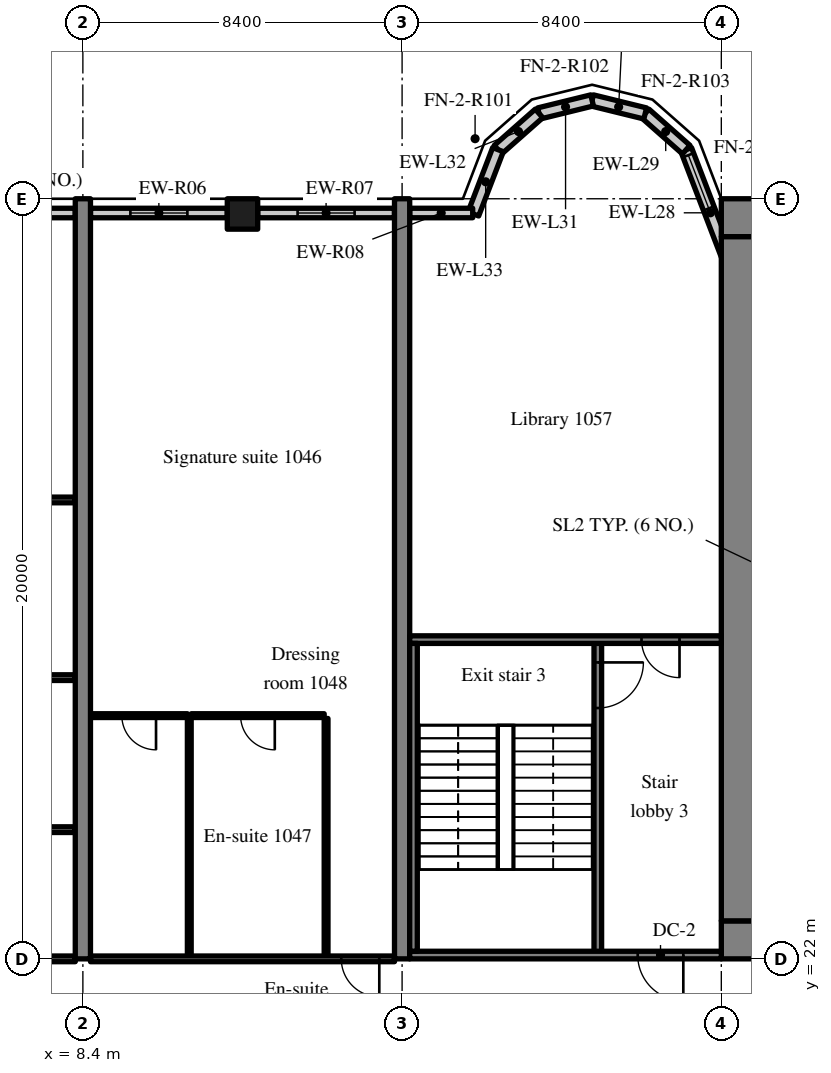
"""IFC4 building model, lengths in metres.
Left out: names, types, materials, properties, quantities, classifications, styles, units other than length and angle.
Written with IfcOpenShell. Run it as: python <this file> out.ifc"""

import sys

from ifc_helpers import new_model, si_unit, direction, frame, frame_2d, origin, origin_2d, place, context, subcontext, project, spatial, rectangle, extrude, source, transform, mapped, element, fill, save


model = new_model("IFC4")
c1 = context("Model", 3, precision=1e-05, world=origin(), true_north=direction((0.0, 1.0)))
c2 = subcontext(c1, "Body", "Model", "MODEL_VIEW")
j1 = project(units=[si_unit("LENGTHUNIT", "METRE"), si_unit("PLANEANGLEUNIT", "RADIAN")], contexts=[c1])
p1 = place(None, origin())
s1 = spatial("IfcSite", under=j1, at=p1, CompositionType="ELEMENT")
p2 = place(p1, origin())
s2 = spatial("IfcBuilding", under=s1, at=p2, CompositionType="ELEMENT")
p3 = place(p2, frame((0.0, 0.0, 46.8)))
s3 = spatial("IfcBuildingStorey", under=s2, at=p3, CompositionType="ELEMENT", Elevation=46.8)
m1 = source(origin(), c2, "Body", "SweptSolid", [
    extrude(rectangle(XDim=50.4, YDim=1.0, at=frame_2d((25.2, 0.0))), origin(), (0.0, 0.0, 1.0), 3.52),
])
p4 = place(p3, frame((25.2, 22.5, 0.0), z_axis=(0.0, 0.0, 1.0), x_axis=(1.0, 0.0, 0.0)))
e1 = element("IfcWall", 1, at=p4, inside=s3, PredefinedType="SHEAR", context=c2, shape_type="MappedRepresentation", body=[
    mapped(m1, transform((0.0, 0.0, 0.0), scale=1.0)),
])
m2 = source(origin(), c2, "Body", "SweptSolid", [
    extrude(rectangle(XDim=1.8, YDim=2.1, at=frame_2d((0.9, 1.05))), frame((0.0, 0.51, 0.0), z_axis=(0.0, -1.0, 0.0), x_axis=(1.0, 0.0, 0.0)), (0.0, 0.0, 1.0), 1.02),
])
p5 = place(p4, frame((15.9, 0.0, 0.0)))
e2 = element("IfcOpeningElement", 2, at=p5, cuts=e1, PredefinedType="OPENING", context=c2, shape_type="MappedRepresentation", body=[
    mapped(m2, transform((0.0, 0.0, 0.0), scale=1.0)),
])
m3 = source(origin(), c2, "Body", "SweptSolid", [
    extrude(rectangle(XDim=1.2, YDim=2.1, at=frame_2d((0.6, 1.05))), frame((0.0, 0.51, 0.0), z_axis=(0.0, -1.0, 0.0), x_axis=(1.0, 0.0, 0.0)), (0.0, 0.0, 1.0), 1.02),
])
p6 = place(p4, frame((26.987, 0.0, 0.0)))
e3 = element("IfcOpeningElement", 3, at=p6, cuts=e1, PredefinedType="OPENING", context=c2, shape_type="MappedRepresentation", body=[
    mapped(m3, transform((0.0, 0.0, 0.0), scale=1.0)),
])
m4 = source(origin(), c2, "Body", "SweptSolid", [
    extrude(rectangle(XDim=0.9, YDim=2.1, at=frame_2d((0.45, 1.05))), frame((0.0, 0.51, 0.0), z_axis=(0.0, -1.0, 0.0), x_axis=(1.0, 0.0, 0.0)), (0.0, 0.0, 1.0), 1.02),
])
p7 = place(p4, frame((33.75, 0.0, 0.0)))
e4 = element("IfcOpeningElement", 4, at=p7, cuts=e1, PredefinedType="OPENING", context=c2, shape_type="MappedRepresentation", body=[
    mapped(m4, transform((0.0, 0.0, 0.0), scale=1.0)),
])
p8 = place(p4, frame((30.75, 0.0, 0.0)))
e5 = element("IfcOpeningElement", 5, at=p8, cuts=e1, PredefinedType="OPENING", context=c2, shape_type="MappedRepresentation", body=[
    mapped(m4, transform((0.0, 0.0, 0.0), scale=1.0)),
])
p9 = place(p4, frame((38.262, 0.0, 0.0)))
e6 = element("IfcOpeningElement", 6, at=p9, cuts=e1, PredefinedType="OPENING", context=c2, shape_type="MappedRepresentation", body=[
    mapped(m4, transform((0.0, 0.0, 0.0), scale=1.0)),
])
p10 = place(p4, frame((6.438, 0.0, 0.0)))
e7 = element("IfcOpeningElement", 7, at=p10, cuts=e1, PredefinedType="OPENING", context=c2, shape_type="MappedRepresentation", body=[
    mapped(m3, transform((0.0, 0.0, 0.0), scale=1.0)),
])
p11 = place(p4, frame((47.725, 0.0, 0.0)))
e8 = element("IfcOpeningElement", 8, at=p11, cuts=e1, PredefinedType="OPENING", context=c2, shape_type="MappedRepresentation", body=[
    mapped(m3, transform((0.0, 0.0, 0.0), scale=1.0)),
])
p12 = place(p3, frame((25.2, 41.5, 0.0), z_axis=(0.0, 0.0, 1.0), x_axis=(1.0, 0.0, 0.0)))
e9 = element("IfcWall", 9, at=p12, inside=s3, PredefinedType="SHEAR", context=c2, shape_type="MappedRepresentation", body=[
    mapped(m1, transform((0.0, 0.0, 0.0), scale=1.0)),
])
m5 = source(origin(), c2, "Body", "SweptSolid", [
    extrude(rectangle(XDim=18.0, YDim=1.0, at=frame_2d((9.0, 0.0))), origin(), (0.0, 0.0, 1.0), 3.52),
])
p13 = place(p3, frame((25.7, 23.0, 0.0), z_axis=(0.0, 0.0, 1.0), x_axis=(0.0, 1.0, 0.0)))
e10 = element("IfcWall", 10, at=p13, inside=s3, PredefinedType="SHEAR", context=c2, shape_type="MappedRepresentation", body=[
    mapped(m5, transform((0.0, 0.0, 0.0), scale=1.0)),
])
m6 = source(origin(), c2, "Body", "SweptSolid", [
    extrude(rectangle(XDim=20.0, YDim=0.4, at=frame_2d((10.0, 0.0))), origin(), (0.0, 0.0, 1.0), 3.52),
])
for number, where, z_axis, x_axis in (
    (11, (8.4, 22.0, 0.0), (0.0, 0.0, 1.0), (0.0, 1.0, 0.0)),
    (12, (16.8, 22.0, 0.0), (0.0, 0.0, 1.0), (0.0, 1.0, 0.0)),
):
    element("IfcWall", number, at=place(p3, frame(where, z_axis=z_axis, x_axis=x_axis)), inside=s3, PredefinedType="SHEAR", context=c2, shape_type="MappedRepresentation", body=[
        mapped(m6, transform((0.0, 0.0, 0.0), scale=1.0)),
    ])
m7 = source(origin(), c2, "Body", "SweptSolid", [
    extrude(rectangle(XDim=0.8, YDim=0.8, at=origin_2d()), origin(), (0.0, 0.0, 1.0), 3.52),
])
p14 = place(p3, frame((12.6, 41.6, 0.0), z_axis=(0.0, 0.0, 1.0), x_axis=(1.0, 0.0, 0.0)))
e13 = element("IfcColumn", 13, at=p14, inside=s3, PredefinedType="COLUMN", context=c2, shape_type="MappedRepresentation", body=[
    mapped(m7, transform((0.0, 0.0, 0.0), scale=1.0)),
])
m8 = source(origin(), c2, "Body", "SweptSolid", [
    extrude(rectangle(XDim=3.559, YDim=0.3, at=frame_2d((1.78, 0.0))), origin(), (0.0, 0.0, 1.0), 3.52),
])
p15 = place(p3, frame((25.55, 39.969, 0.0), z_axis=(0.0, 0.0, 1.0), x_axis=(-0.35779745313, 0.933799219604, 0.0)))
e14 = element("IfcWall", 14, at=p15, inside=s3, PredefinedType="SOLIDWALL", context=c2, shape_type="MappedRepresentation", body=[
    mapped(m8, transform((0.0, 0.0, 0.0), scale=1.0)),
])
m9 = source(origin(), c2, "Body", "SweptSolid", [
    extrude(rectangle(XDim=1.5, YDim=2.0, at=frame_2d((0.75, 1.0))), frame((0.0, 0.16, 0.0), z_axis=(0.0, -1.0, 0.0), x_axis=(1.0, 0.0, 0.0)), (0.0, 0.0, 1.0), 0.32),
])
p16 = place(p15, frame((1.903, 0.0, 0.9)))
e15 = element("IfcOpeningElement", 15, at=p16, cuts=e14, PredefinedType="OPENING", context=c2, shape_type="MappedRepresentation", body=[
    mapped(m9, transform((0.0, 0.0, 0.0), scale=1.0)),
])
m10 = source(origin(), c2, "Body", "SweptSolid", [
    extrude(rectangle(XDim=1.44, YDim=0.3, at=frame_2d((0.72, 0.0))), origin(), (0.0, 0.0, 1.0), 3.52),
])
p17 = place(p3, frame((24.277, 43.292, 0.0), z_axis=(0.0, 0.0, 1.0), x_axis=(-0.749649827867, 0.661834673902, 0.0)))
e16 = element("IfcWall", 16, at=p17, inside=s3, PredefinedType="SOLIDWALL", context=c2, shape_type="MappedRepresentation", body=[
    mapped(m10, transform((0.0, 0.0, 0.0), scale=1.0)),
])
m11 = source(origin(), c2, "Body", "SweptSolid", [
    extrude(rectangle(XDim=1.438, YDim=0.3, at=frame_2d((0.719, 0.0))), origin(), (0.0, 0.0, 1.0), 3.52),
])
p18 = place(p3, frame((23.197, 44.245, 0.0), z_axis=(0.0, 0.0, 1.0), x_axis=(-0.971152283879, 0.238460146601, 0.0)))
e17 = element("IfcWall", 17, at=p18, inside=s3, PredefinedType="SOLIDWALL", context=c2, shape_type="MappedRepresentation", body=[
    mapped(m11, transform((0.0, 0.0, 0.0), scale=1.0)),
])
m12 = source(origin(), c2, "Body", "SweptSolid", [
    extrude(rectangle(XDim=1.439, YDim=0.3, at=frame_2d((0.719, 0.0))), origin(), (0.0, 0.0, 1.0), 3.52),
])
p19 = place(p3, frame((21.8, 44.588, 0.0), z_axis=(0.0, 0.0, 1.0), x_axis=(-0.971161932466, -0.238420848351, 0.0)))
e18 = element("IfcWall", 18, at=p19, inside=s3, PredefinedType="SOLIDWALL", context=c2, shape_type="MappedRepresentation", body=[
    mapped(m12, transform((0.0, 0.0, 0.0), scale=1.0)),
])
m13 = source(origin(), c2, "Body", "SweptSolid", [
    extrude(rectangle(XDim=1.44, YDim=0.3, at=frame_2d((0.72, 0.0))), origin(), (0.0, 0.0, 1.0), 3.52),
])
p20 = place(p3, frame((20.403, 44.245, 0.0), z_axis=(0.0, 0.0, 1.0), x_axis=(-0.74957555648, -0.661918790432, 0.0)))
e19 = element("IfcWall", 19, at=p20, inside=s3, PredefinedType="SOLIDWALL", context=c2, shape_type="MappedRepresentation", body=[
    mapped(m13, transform((0.0, 0.0, 0.0), scale=1.0)),
])
m14 = source(origin(), c2, "Body", "SweptSolid", [
    extrude(rectangle(XDim=1.812, YDim=0.3, at=frame_2d((0.906, 0.0))), origin(), (0.0, 0.0, 1.0), 3.52),
])
p21 = place(p3, frame((19.323, 43.292, 0.0), z_axis=(0.0, 0.0, 1.0), x_axis=(-0.357877270961, -0.93376863244, 0.0)))
e20 = element("IfcWall", 20, at=p21, inside=s3, PredefinedType="SOLIDWALL", context=c2, shape_type="MappedRepresentation", body=[
    mapped(m14, transform((0.0, 0.0, 0.0), scale=1.0)),
])
m15 = source(origin(), c2, "Body", "SweptSolid", [
    extrude(rectangle(XDim=4.045, YDim=0.25, at=frame_2d((2.022, 0.0))), origin(), (0.0, 0.0, 1.0), 2.82),
])
p22 = place(p3, frame((8.2, 41.625, 0.0), z_axis=(0.0, 0.0, 1.0), x_axis=(-1.0, 0.0, 0.0)))
e21 = element("IfcWall", 21, at=p22, inside=s3, PredefinedType="SOLIDWALL", context=c2, shape_type="MappedRepresentation", body=[
    mapped(m15, transform((0.0, 0.0, 0.0), scale=1.0)),
])
m16 = source(origin(), c2, "Body", "SweptSolid", [
    extrude(rectangle(XDim=1.5, YDim=1.5, at=frame_2d((0.75, 0.75))), frame((0.0, 0.135, 0.0), z_axis=(0.0, -1.0, 0.0), x_axis=(1.0, 0.0, 0.0)), (0.0, 0.0, 1.0), 0.27),
])
p23 = place(p22, frame((1.272, 0.0, 0.9)))
e22 = element("IfcOpeningElement", 22, at=p23, cuts=e21, PredefinedType="OPENING", context=c2, shape_type="MappedRepresentation", body=[
    mapped(m16, transform((0.0, 0.0, 0.0), scale=1.0)),
])
m17 = source(origin(), c2, "Body", "SweptSolid", [
    extrude(rectangle(XDim=3.6, YDim=0.25, at=frame_2d((1.8, 0.0))), origin(), (0.0, 0.0, 1.0), 2.82),
])
p24 = place(p3, frame((12.2, 41.625, 0.0), z_axis=(0.0, 0.0, 1.0), x_axis=(-1.0, 0.0, 0.0)))
e23 = element("IfcWall", 23, at=p24, inside=s3, PredefinedType="SOLIDWALL", context=c2, shape_type="MappedRepresentation", body=[
    mapped(m17, transform((0.0, 0.0, 0.0), scale=1.0)),
])
p25 = place(p24, frame((1.05, 0.0, 0.9)))
e24 = element("IfcOpeningElement", 24, at=p25, cuts=e23, PredefinedType="OPENING", context=c2, shape_type="MappedRepresentation", body=[
    mapped(m16, transform((0.0, 0.0, 0.0), scale=1.0)),
])
m18 = source(origin(), c2, "Body", "SweptSolid", [
    extrude(rectangle(XDim=3.6, YDim=0.25, at=frame_2d((1.8, 0.0))), origin(), (0.0, 0.0, 1.0), 2.82),
])
p26 = place(p3, frame((16.6, 41.625, 0.0), z_axis=(0.0, 0.0, 1.0), x_axis=(-1.0, 0.0, 0.0)))
e25 = element("IfcWall", 25, at=p26, inside=s3, PredefinedType="SOLIDWALL", context=c2, shape_type="MappedRepresentation", body=[
    mapped(m18, transform((0.0, 0.0, 0.0), scale=1.0)),
])
p27 = place(p26, frame((1.05, 0.0, 0.9)))
e26 = element("IfcOpeningElement", 26, at=p27, cuts=e25, PredefinedType="OPENING", context=c2, shape_type="MappedRepresentation", body=[
    mapped(m16, transform((0.0, 0.0, 0.0), scale=1.0)),
])
m19 = source(origin(), c2, "Body", "SweptSolid", [
    extrude(rectangle(XDim=1.658, YDim=0.25, at=frame_2d((0.829, 0.0))), origin(), (0.0, 0.0, 1.0), 2.82),
])
p28 = place(p3, frame((18.658, 41.625, 0.0), z_axis=(0.0, 0.0, 1.0), x_axis=(-1.0, 0.0, 0.0)))
e27 = element("IfcWall", 27, at=p28, inside=s3, PredefinedType="SOLIDWALL", context=c2, shape_type="MappedRepresentation", body=[
    mapped(m19, transform((0.0, 0.0, 0.0), scale=1.0)),
])
m20 = source(origin(), c2, "Body", "SweptSolid", [
    extrude(rectangle(XDim=8.3, YDim=0.2, at=frame_2d((4.15, 0.0))), origin(), (0.0, 0.0, 1.0), 3.52),
])
p29 = place(p3, frame((21.95, 22.1, 0.0), z_axis=(0.0, 0.0, 1.0), x_axis=(0.0, 1.0, 0.0)))
e28 = element("IfcWall", 28, at=p29, inside=s3, PredefinedType="SOLIDWALL", context=c2, shape_type="MappedRepresentation", body=[
    mapped(m20, transform((0.0, 0.0, 0.0), scale=1.0)),
])
m21 = source(origin(), c2, "Body", "SweptSolid", [
    extrude(rectangle(XDim=1.2, YDim=2.1, at=frame_2d((0.6, 1.05))), frame((0.0, 0.11, 0.0), z_axis=(0.0, -1.0, 0.0), x_axis=(1.0, 0.0, 0.0)), (0.0, 0.0, 1.0), 0.22),
])
p30 = place(p29, frame((6.5, 0.0, 0.0)))
e29 = element("IfcOpeningElement", 29, at=p30, cuts=e28, PredefinedType="OPENING", context=c2, shape_type="MappedRepresentation", body=[
    mapped(m21, transform((0.0, 0.0, 0.0), scale=1.0)),
])
m22 = source(origin(), c2, "Body", "SweptSolid", [
    extrude(rectangle(XDim=8.2, YDim=0.2, at=frame_2d((4.1, 0.0))), origin(), (0.0, 0.0, 1.0), 3.52),
])
p31 = place(p3, frame((17.0, 22.1, 0.0), z_axis=(0.0, 0.0, 1.0), x_axis=(1.0, 0.0, 0.0)))
e30 = element("IfcWall", 30, at=p31, inside=s3, PredefinedType="SOLIDWALL", context=c2, shape_type="MappedRepresentation", body=[
    mapped(m22, transform((0.0, 0.0, 0.0), scale=1.0)),
])
p32 = place(p31, frame((6.0, 0.0, 0.0)))
e31 = element("IfcOpeningElement", 31, at=p32, cuts=e30, PredefinedType="OPENING", context=c2, shape_type="MappedRepresentation", body=[
    mapped(m21, transform((0.0, 0.0, 0.0), scale=1.0)),
])
p33 = place(p3, frame((17.0, 30.4, 0.0), z_axis=(0.0, 0.0, 1.0), x_axis=(1.0, 0.0, 0.0)))
e32 = element("IfcWall", 32, at=p33, inside=s3, PredefinedType="SOLIDWALL", context=c2, shape_type="MappedRepresentation", body=[
    mapped(m22, transform((0.0, 0.0, 0.0), scale=1.0)),
])
m23 = source(origin(), c2, "Body", "SweptSolid", [
    extrude(rectangle(XDim=1.0, YDim=2.1, at=frame_2d((0.5, 1.05))), frame((0.0, 0.11, 0.0), z_axis=(0.0, -1.0, 0.0), x_axis=(1.0, 0.0, 0.0)), (0.0, 0.0, 1.0), 0.22),
])
p34 = place(p33, frame((6.1, 0.0, 0.0)))
e33 = element("IfcOpeningElement", 33, at=p34, cuts=e32, PredefinedType="OPENING", context=c2, shape_type="MappedRepresentation", body=[
    mapped(m23, transform((0.0, 0.0, 0.0), scale=1.0)),
])
m24 = source(origin(), c2, "Body", "SweptSolid", [
    extrude(rectangle(XDim=8.1, YDim=0.2, at=frame_2d((4.05, 0.0))), origin(), (0.0, 0.0, 1.0), 3.52),
])
p35 = place(p3, frame((17.1, 22.2, 0.0), z_axis=(0.0, 0.0, 1.0), x_axis=(0.0, 1.0, 0.0)))
e34 = element("IfcWall", 34, at=p35, inside=s3, PredefinedType="SOLIDWALL", context=c2, shape_type="MappedRepresentation", body=[
    mapped(m24, transform((0.0, 0.0, 0.0), scale=1.0)),
])
m25 = source(origin(), c2, "Body", "SweptSolid", [
    extrude(rectangle(XDim=5.25, YDim=0.15, at=frame_2d((2.625, 0.0))), origin(), (0.0, 0.0, 1.0), 2.82),
])
p36 = place(p3, frame((2.95, 22.0, 0.0), z_axis=(0.0, 0.0, 1.0), x_axis=(1.0, 0.0, 0.0)))
e35 = element("IfcWall", 35, at=p36, inside=s3, PredefinedType="PARTITIONING", context=c2, shape_type="MappedRepresentation", body=[
    mapped(m25, transform((0.0, 0.0, 0.0), scale=1.0)),
])
m26 = source(origin(), c2, "Body", "SweptSolid", [
    extrude(rectangle(XDim=5.25, YDim=0.15, at=frame_2d((2.625, 0.0))), origin(), (0.0, 0.0, 1.0), 3.52),
])
for number, where, z_axis, x_axis in (
    (36, (2.95, 25.4, 0.0), (0.0, 0.0, 1.0), (1.0, 0.0, 0.0)),
    (37, (2.95, 29.4, 0.0), (0.0, 0.0, 1.0), (1.0, 0.0, 0.0)),
):
    element("IfcWall", number, at=place(p3, frame(where, z_axis=z_axis, x_axis=x_axis)), inside=s3, PredefinedType="PARTITIONING", context=c2, shape_type="MappedRepresentation", body=[
        mapped(m26, transform((0.0, 0.0, 0.0), scale=1.0)),
    ])
m27 = source(origin(), c2, "Body", "SweptSolid", [
    extrude(rectangle(XDim=7.8, YDim=0.15, at=frame_2d((3.9, 0.0))), origin(), (0.0, 0.0, 1.0), 3.52),
])
p37 = place(p3, frame((0.4, 34.075, 0.0), z_axis=(0.0, 0.0, 1.0), x_axis=(1.0, 0.0, 0.0)))
e38 = element("IfcWall", 38, at=p37, inside=s3, PredefinedType="PARTITIONING", context=c2, shape_type="MappedRepresentation", body=[
    mapped(m27, transform((0.0, 0.0, 0.0), scale=1.0)),
])
m28 = source(origin(), c2, "Body", "SweptSolid", [
    extrude(rectangle(XDim=1.0, YDim=2.1, at=frame_2d((0.5, 1.05))), frame((0.0, 0.085, 0.0), z_axis=(0.0, -1.0, 0.0), x_axis=(1.0, 0.0, 0.0)), (0.0, 0.0, 1.0), 0.17),
])
p38 = place(p37, frame((0.7, 0.0, 0.0)))
e39 = element("IfcOpeningElement", 39, at=p38, cuts=e38, PredefinedType="OPENING", context=c2, shape_type="MappedRepresentation", body=[
    mapped(m28, transform((0.0, 0.0, 0.0), scale=1.0)),
])
m29 = source(origin(), c2, "Body", "SweptSolid", [
    extrude(rectangle(XDim=6.25, YDim=0.1, at=frame_2d((3.125, 0.0))), origin(), (0.0, 0.0, 1.0), 3.52),
])
for number, where, z_axis, x_axis in (
    (40, (14.8, 22.075, 0.0), (0.0, 0.0, 1.0), (0.0, 1.0, 0.0)),
    (41, (11.2, 22.075, 0.0), (0.0, 0.0, 1.0), (0.0, 1.0, 0.0)),
):
    element("IfcWall", number, at=place(p3, frame(where, z_axis=z_axis, x_axis=x_axis)), inside=s3, PredefinedType="PARTITIONING", context=c2, shape_type="MappedRepresentation", body=[
        mapped(m29, transform((0.0, 0.0, 0.0), scale=1.0)),
    ])
m30 = source(origin(), c2, "Body", "SweptSolid", [
    extrude(rectangle(XDim=3.5, YDim=0.1, at=frame_2d((1.75, 0.0))), origin(), (0.0, 0.0, 1.0), 3.52),
])
p39 = place(p3, frame((11.25, 28.4, 0.0), z_axis=(0.0, 0.0, 1.0), x_axis=(1.0, 0.0, 0.0)))
e42 = element("IfcWall", 42, at=p39, inside=s3, PredefinedType="PARTITIONING", context=c2, shape_type="MappedRepresentation", body=[
    mapped(m30, transform((0.0, 0.0, 0.0), scale=1.0)),
])
m31 = source(origin(), c2, "Body", "SweptSolid", [
    extrude(rectangle(XDim=0.9, YDim=2.1, at=frame_2d((0.45, 1.05))), frame((0.0, 0.06, 0.0), z_axis=(0.0, -1.0, 0.0), x_axis=(1.0, 0.0, 0.0)), (0.0, 0.0, 1.0), 0.12),
])
p40 = place(p39, frame((1.3, 0.0, 0.0)))
e43 = element("IfcOpeningElement", 43, at=p40, cuts=e42, PredefinedType="OPENING", context=c2, shape_type="MappedRepresentation", body=[
    mapped(m31, transform((0.0, 0.0, 0.0), scale=1.0)),
])
m32 = source(origin(), c2, "Body", "SweptSolid", [
    extrude(rectangle(XDim=2.55, YDim=0.1, at=frame_2d((1.275, 0.0))), origin(), (0.0, 0.0, 1.0), 3.52),
])
p41 = place(p3, frame((8.6, 28.4, 0.0), z_axis=(0.0, 0.0, 1.0), x_axis=(1.0, 0.0, 0.0)))
e44 = element("IfcWall", 44, at=p41, inside=s3, PredefinedType="PARTITIONING", context=c2, shape_type="MappedRepresentation", body=[
    mapped(m32, transform((0.0, 0.0, 0.0), scale=1.0)),
])
p42 = place(p41, frame((0.825, 0.0, 0.0)))
e45 = element("IfcOpeningElement", 45, at=p42, cuts=e44, PredefinedType="OPENING", context=c2, shape_type="MappedRepresentation", body=[
    mapped(m31, transform((0.0, 0.0, 0.0), scale=1.0)),
])
m33 = source(origin(), c2, "Body", "SweptSolid", [
    extrude(rectangle(XDim=8.0, YDim=0.15, at=frame_2d((4.0, 0.0))), origin(), (0.0, 0.0, 1.0), 2.82),
])
p43 = place(p3, frame((8.6, 22.0, 0.0), z_axis=(0.0, 0.0, 1.0), x_axis=(1.0, 0.0, 0.0)))
e46 = element("IfcWall", 46, at=p43, inside=s3, PredefinedType="PARTITIONING", context=c2, shape_type="MappedRepresentation", body=[
    mapped(m33, transform((0.0, 0.0, 0.0), scale=1.0)),
])
p44 = place(p43, frame((6.6, 0.0, 0.0)))
e47 = element("IfcOpeningElement", 47, at=p44, cuts=e46, PredefinedType="OPENING", context=c2, shape_type="MappedRepresentation", body=[
    mapped(m28, transform((0.0, 0.0, 0.0), scale=1.0)),
])
m34 = source(origin(), c2, "Body", "SweptSolid", [
    extrude(rectangle(XDim=1.5, YDim=2.0, at=frame_2d((0.75, 1.0))), frame((0.0, 0.03, 0.0), z_axis=(0.0, -1.0, 0.0), x_axis=(1.0, 0.0, 0.0)), (0.0, 0.0, 1.0), 0.06),
])
p45 = place(p16, origin())
e48 = element("IfcWindow", 48, at=p45, inside=s3, PartitioningType="SINGLE_PANEL", PredefinedType="WINDOW", context=c2, shape_type="MappedRepresentation", body=[
    mapped(m34, transform((0.0, 0.0, 0.0), scale=1.0)),
])
fill(e15, e48)
m35 = source(origin(), c2, "Body", "SweptSolid", [
    extrude(rectangle(XDim=1.5, YDim=1.5, at=frame_2d((0.75, 0.75))), frame((0.0, 0.03, 0.0), z_axis=(0.0, -1.0, 0.0), x_axis=(1.0, 0.0, 0.0)), (0.0, 0.0, 1.0), 0.06),
])
p46 = place(p25, origin())
e49 = element("IfcWindow", 49, at=p46, inside=s3, PartitioningType="SINGLE_PANEL", PredefinedType="WINDOW", context=c2, shape_type="MappedRepresentation", body=[
    mapped(m35, transform((0.0, 0.0, 0.0), scale=1.0)),
])
fill(e24, e49)
p47 = place(p27, origin())
e50 = element("IfcWindow", 50, at=p47, inside=s3, PartitioningType="SINGLE_PANEL", PredefinedType="WINDOW", context=c2, shape_type="MappedRepresentation", body=[
    mapped(m35, transform((0.0, 0.0, 0.0), scale=1.0)),
])
fill(e26, e50)
m36 = source(origin(), c2, "Body", "SweptSolid", [
    extrude(rectangle(XDim=1.2, YDim=2.1, at=frame_2d((0.6, 1.05))), frame((0.0, 0.025, 0.0), z_axis=(0.0, -1.0, 0.0), x_axis=(1.0, 0.0, 0.0)), (0.0, 0.0, 1.0), 0.05),
])
p48 = place(p30, origin())
e51 = element("IfcDoor", 51, at=p48, inside=s3, OperationType="SINGLE_SWING_RIGHT", PredefinedType="DOOR", context=c2, shape_type="MappedRepresentation", body=[
    mapped(m36, transform((0.0, 0.0, 0.0), scale=1.0)),
])
fill(e29, e51)
p49 = place(p32, origin())
e52 = element("IfcDoor", 52, at=p49, inside=s3, OperationType="SINGLE_SWING_RIGHT", PredefinedType="DOOR", context=c2, shape_type="MappedRepresentation", body=[
    mapped(m36, transform((0.0, 0.0, 0.0), scale=1.0)),
])
fill(e31, e52)
m37 = source(origin(), c2, "Body", "SweptSolid", [
    extrude(rectangle(XDim=1.0, YDim=2.1, at=frame_2d((0.5, 1.05))), frame((0.0, 0.025, 0.0), z_axis=(0.0, -1.0, 0.0), x_axis=(1.0, 0.0, 0.0)), (0.0, 0.0, 1.0), 0.05),
])
p50 = place(p34, origin())
e53 = element("IfcDoor", 53, at=p50, inside=s3, OperationType="SINGLE_SWING_RIGHT", PredefinedType="DOOR", context=c2, shape_type="MappedRepresentation", body=[
    mapped(m37, transform((0.0, 0.0, 0.0), scale=1.0)),
])
fill(e33, e53)
m38 = source(origin(), c2, "Body", "SweptSolid", [
    extrude(rectangle(XDim=0.9, YDim=2.1, at=frame_2d((0.45, 1.05))), frame((0.0, 0.025, 0.0), z_axis=(0.0, -1.0, 0.0), x_axis=(1.0, 0.0, 0.0)), (0.0, 0.0, 1.0), 0.05),
])
p51 = place(p40, origin())
e54 = element("IfcDoor", 54, at=p51, inside=s3, OperationType="SINGLE_SWING_RIGHT", PredefinedType="DOOR", context=c2, shape_type="MappedRepresentation", body=[
    mapped(m38, transform((0.0, 0.0, 0.0), scale=1.0)),
])
fill(e43, e54)
p52 = place(p42, origin())
e55 = element("IfcDoor", 55, at=p52, inside=s3, OperationType="SINGLE_SWING_RIGHT", PredefinedType="DOOR", context=c2, shape_type="MappedRepresentation", body=[
    mapped(m38, transform((0.0, 0.0, 0.0), scale=1.0)),
])
fill(e45, e55)
p53 = place(p44, origin())
e56 = element("IfcDoor", 56, at=p53, inside=s3, OperationType="SINGLE_SWING_RIGHT", PredefinedType="DOOR", context=c2, shape_type="MappedRepresentation", body=[
    mapped(m37, transform((0.0, 0.0, 0.0), scale=1.0)),
])
fill(e47, e56)
save(model, sys.argv[1])
